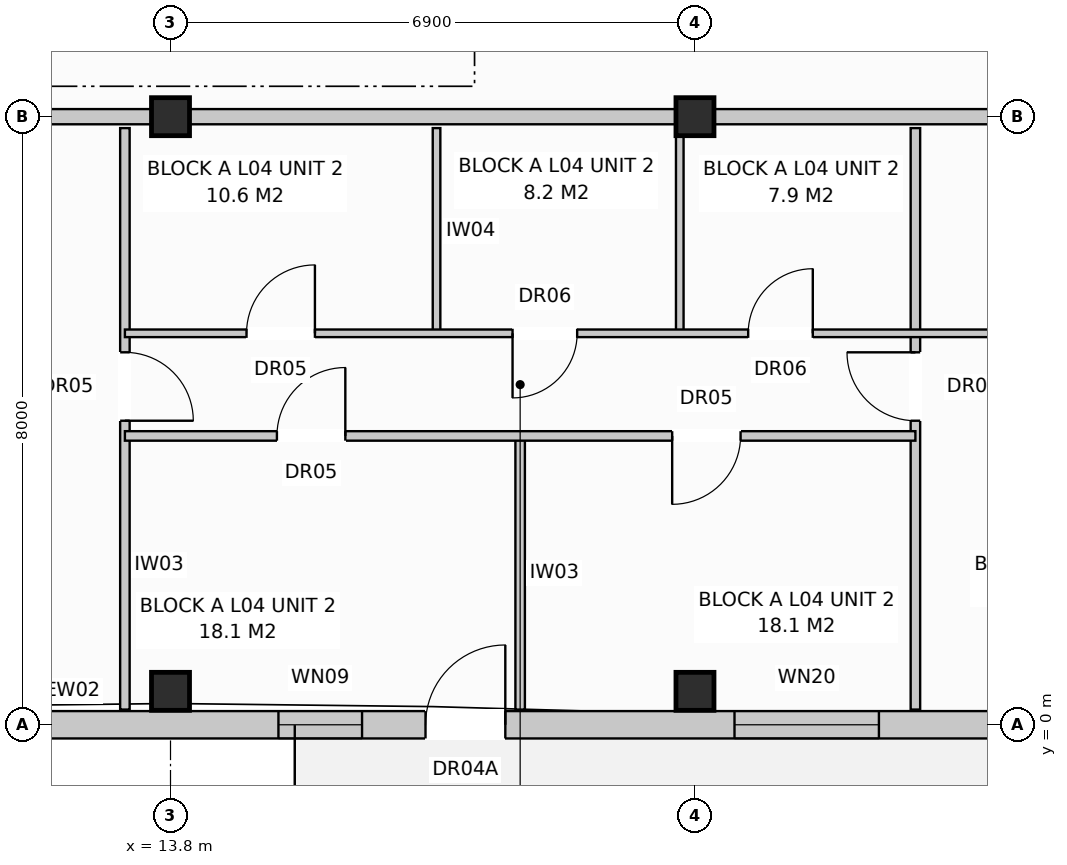
"""IFC4 building model, lengths in metres.
Left out: names, types, materials, properties, quantities, classifications, styles, units other than length and angle.
Written with IfcOpenShell. Run it as: python <this file> out.ifc"""

import sys

from ifc_helpers import new_model, si_unit, direction, frame, frame_2d, origin, origin_with_axes, origin_2d, place, context, subcontext, project, spatial, rectangle, extrude, element, fill, save


model = new_model("IFC4")
c1 = context("Model", 3, precision=1e-05, world=origin(), true_north=direction((0.0, 1.0)))
c2 = subcontext(c1, "Body", "Model", "MODEL_VIEW")
j1 = project(units=[si_unit("LENGTHUNIT", "METRE"), si_unit("PLANEANGLEUNIT", "RADIAN")], contexts=[c1])
p1 = place(None, origin())
s1 = spatial("IfcSite", under=j1, at=p1, CompositionType="ELEMENT")
p2 = place(p1, origin())
s2 = spatial("IfcBuilding", under=s1, at=p2, CompositionType="ELEMENT")
p3 = place(p2, frame((0.0, 0.0, 14.4)))
s3 = spatial("IfcBuildingStorey", under=s2, at=p3, CompositionType="ELEMENT", Elevation=14.4)
for number, where, z_axis, x_axis in (
    (1, (13.8, 0.44, 0.0), (0.0, 0.0, 1.0), (1.0, 0.0, 0.0)),
    (2, (13.8, 8.0, 0.0), (0.0, 0.0, 1.0), (1.0, 0.0, 0.0)),
    (3, (20.7, 0.44, 0.0), (0.0, 0.0, 1.0), (1.0, 0.0, 0.0)),
    (4, (20.7, 8.0, 0.0), (0.0, 0.0, 1.0), (1.0, 0.0, 0.0)),
):
    element("IfcColumn", number, at=place(p3, frame(where, z_axis=z_axis, x_axis=x_axis)), inside=s3, PredefinedType="COLUMN", context=c2, shape_type="SweptSolid", body=[
        extrude(rectangle(XDim=0.5, YDim=0.5, at=origin_2d()), origin(), (0.0, 0.0, 1.0), 3.2),
    ])
p4 = place(p3, frame((0.17, 0.0, 0.0), z_axis=(0.0, 0.0, 1.0), x_axis=(1.0, 0.0, 0.0)))
e5 = element("IfcWall", 5, at=p4, inside=s3, PredefinedType="STANDARD", context=c2, shape_type="SweptSolid", body=[
    extrude(rectangle(XDim=54.86, YDim=0.36, at=frame_2d((27.43, 0.0))), origin(), (0.0, 0.0, 1.0), 2.94),
])
p5 = place(p4, frame((2.485, 0.0, 0.0)))
e6 = element("IfcOpeningElement", 6, at=p5, cuts=e5, PredefinedType="OPENING", context=c2, shape_type="SweptSolid", body=[
    extrude(rectangle(XDim=1.05, YDim=2.12, at=frame_2d((0.525, 1.06))), frame((0.0, 0.192, 0.0), z_axis=(0.0, -1.0, 0.0), x_axis=(1.0, 0.0, 0.0)), (0.0, 0.0, 1.0), 0.384),
])
p6 = place(p4, frame((16.985, 0.0, 0.0)))
e7 = element("IfcOpeningElement", 7, at=p6, cuts=e5, PredefinedType="OPENING", context=c2, shape_type="SweptSolid", body=[
    extrude(rectangle(XDim=1.05, YDim=2.12, at=frame_2d((0.525, 1.06))), frame((0.0, 0.192, 0.0), z_axis=(0.0, -1.0, 0.0), x_axis=(1.0, 0.0, 0.0)), (0.0, 0.0, 1.0), 0.384),
])
p7 = place(p4, frame((30.085, 0.0, 0.0)))
e8 = element("IfcOpeningElement", 8, at=p7, cuts=e5, PredefinedType="OPENING", context=c2, shape_type="SweptSolid", body=[
    extrude(rectangle(XDim=1.05, YDim=2.12, at=frame_2d((0.525, 1.06))), frame((0.0, 0.192, 0.0), z_axis=(0.0, -1.0, 0.0), x_axis=(1.0, 0.0, 0.0)), (0.0, 0.0, 1.0), 0.384),
])
p8 = place(p4, frame((44.141, 0.0, 0.0)))
e9 = element("IfcOpeningElement", 9, at=p8, cuts=e5, PredefinedType="OPENING", context=c2, shape_type="SweptSolid", body=[
    extrude(rectangle(XDim=1.05, YDim=2.12, at=frame_2d((0.525, 1.06))), frame((0.0, 0.192, 0.0), z_axis=(0.0, -1.0, 0.0), x_axis=(1.0, 0.0, 0.0)), (0.0, 0.0, 1.0), 0.384),
])
p9 = place(p4, frame((0.75, 0.0, 0.72)))
e10 = element("IfcOpeningElement", 10, at=p9, cuts=e5, PredefinedType="OPENING", context=c2, shape_type="SweptSolid", body=[
    extrude(rectangle(XDim=1.1, YDim=1.5, at=frame_2d((0.55, 0.75))), frame((0.0, 0.192, 0.0), z_axis=(0.0, -1.0, 0.0), x_axis=(1.0, 0.0, 0.0)), (0.0, 0.0, 1.0), 0.384),
])
p10 = place(p4, frame((4.25, 0.0, 0.72)))
e11 = element("IfcOpeningElement", 11, at=p10, cuts=e5, PredefinedType="OPENING", context=c2, shape_type="SweptSolid", body=[
    extrude(rectangle(XDim=1.9, YDim=1.85, at=frame_2d((0.95, 0.925))), frame((0.0, 0.192, 0.0), z_axis=(0.0, -1.0, 0.0), x_axis=(1.0, 0.0, 0.0)), (0.0, 0.0, 1.0), 0.384),
])
p11 = place(p4, frame((8.925, 0.0, 0.8)))
e12 = element("IfcOpeningElement", 12, at=p11, cuts=e5, PredefinedType="OPENING", context=c2, shape_type="SweptSolid", body=[
    extrude(rectangle(XDim=1.95, YDim=1.65, at=frame_2d((0.975, 0.825))), frame((0.0, 0.192, 0.0), z_axis=(0.0, -1.0, 0.0), x_axis=(1.0, 0.0, 0.0)), (0.0, 0.0, 1.0), 0.384),
])
p12 = place(p4, frame((15.05, 0.0, 0.72)))
e13 = element("IfcOpeningElement", 13, at=p12, cuts=e5, PredefinedType="OPENING", context=c2, shape_type="SweptSolid", body=[
    extrude(rectangle(XDim=1.1, YDim=1.5, at=frame_2d((0.55, 0.75))), frame((0.0, 0.192, 0.0), z_axis=(0.0, -1.0, 0.0), x_axis=(1.0, 0.0, 0.0)), (0.0, 0.0, 1.0), 0.384),
])
p13 = place(p4, frame((21.05, 0.0, 0.72)))
e14 = element("IfcOpeningElement", 14, at=p13, cuts=e5, PredefinedType="OPENING", context=c2, shape_type="SweptSolid", body=[
    extrude(rectangle(XDim=1.9, YDim=1.85, at=frame_2d((0.95, 0.925))), frame((0.0, 0.192, 0.0), z_axis=(0.0, -1.0, 0.0), x_axis=(1.0, 0.0, 0.0)), (0.0, 0.0, 1.0), 0.384),
])
p14 = place(p4, frame((24.85, 0.0, 0.72)))
e15 = element("IfcOpeningElement", 15, at=p14, cuts=e5, PredefinedType="OPENING", context=c2, shape_type="SweptSolid", body=[
    extrude(rectangle(XDim=1.1, YDim=1.5, at=frame_2d((0.55, 0.75))), frame((0.0, 0.192, 0.0), z_axis=(0.0, -1.0, 0.0), x_axis=(1.0, 0.0, 0.0)), (0.0, 0.0, 1.0), 0.384),
])
p15 = place(p4, frame((28.35, 0.0, 0.72)))
e16 = element("IfcOpeningElement", 16, at=p15, cuts=e5, PredefinedType="OPENING", context=c2, shape_type="SweptSolid", body=[
    extrude(rectangle(XDim=1.1, YDim=1.5, at=frame_2d((0.55, 0.75))), frame((0.0, 0.192, 0.0), z_axis=(0.0, -1.0, 0.0), x_axis=(1.0, 0.0, 0.0)), (0.0, 0.0, 1.0), 0.384),
])
p16 = place(p4, frame((31.85, 0.0, 0.72)))
e17 = element("IfcOpeningElement", 17, at=p16, cuts=e5, PredefinedType="OPENING", context=c2, shape_type="SweptSolid", body=[
    extrude(rectangle(XDim=1.9, YDim=1.85, at=frame_2d((0.95, 0.925))), frame((0.0, 0.192, 0.0), z_axis=(0.0, -1.0, 0.0), x_axis=(1.0, 0.0, 0.0)), (0.0, 0.0, 1.0), 0.384),
])
p17 = place(p4, frame((35.525, 0.0, 0.8)))
e18 = element("IfcOpeningElement", 18, at=p17, cuts=e5, PredefinedType="OPENING", context=c2, shape_type="SweptSolid", body=[
    extrude(rectangle(XDim=1.95, YDim=1.65, at=frame_2d((0.975, 0.825))), frame((0.0, 0.192, 0.0), z_axis=(0.0, -1.0, 0.0), x_axis=(1.0, 0.0, 0.0)), (0.0, 0.0, 1.0), 0.384),
])
p18 = place(p4, frame((39.25, 0.0, 0.72)))
e19 = element("IfcOpeningElement", 19, at=p18, cuts=e5, PredefinedType="OPENING", context=c2, shape_type="SweptSolid", body=[
    extrude(rectangle(XDim=1.1, YDim=1.5, at=frame_2d((0.55, 0.75))), frame((0.0, 0.192, 0.0), z_axis=(0.0, -1.0, 0.0), x_axis=(1.0, 0.0, 0.0)), (0.0, 0.0, 1.0), 0.384),
])
p19 = place(p4, frame((42.35, 0.0, 0.72)))
e20 = element("IfcOpeningElement", 20, at=p19, cuts=e5, PredefinedType="OPENING", context=c2, shape_type="SweptSolid", body=[
    extrude(rectangle(XDim=1.1, YDim=1.5, at=frame_2d((0.55, 0.75))), frame((0.0, 0.192, 0.0), z_axis=(0.0, -1.0, 0.0), x_axis=(1.0, 0.0, 0.0)), (0.0, 0.0, 1.0), 0.384),
])
p20 = place(p4, frame((45.725, 0.0, 0.8)))
e21 = element("IfcOpeningElement", 21, at=p20, cuts=e5, PredefinedType="OPENING", context=c2, shape_type="SweptSolid", body=[
    extrude(rectangle(XDim=1.95, YDim=1.65, at=frame_2d((0.975, 0.825))), frame((0.0, 0.192, 0.0), z_axis=(0.0, -1.0, 0.0), x_axis=(1.0, 0.0, 0.0)), (0.0, 0.0, 1.0), 0.384),
])
p21 = place(p4, frame((51.85, 0.0, 0.72)))
e22 = element("IfcOpeningElement", 22, at=p21, cuts=e5, PredefinedType="OPENING", context=c2, shape_type="SweptSolid", body=[
    extrude(rectangle(XDim=1.1, YDim=1.5, at=frame_2d((0.55, 0.75))), frame((0.0, 0.192, 0.0), z_axis=(0.0, -1.0, 0.0), x_axis=(1.0, 0.0, 0.0)), (0.0, 0.0, 1.0), 0.384),
])
p22 = place(p3, frame((6.9, 8.0, 0.0), z_axis=(0.0, 0.0, 1.0), x_axis=(1.0, 0.0, 0.0)))
e23 = element("IfcWall", 23, at=p22, inside=s3, PredefinedType="PARTITIONING", context=c2, shape_type="SweptSolid", body=[
    extrude(rectangle(XDim=20.7, YDim=0.2, at=frame_2d((10.35, 0.0))), origin(), (0.0, 0.0, 1.0), 2.38),
])
p23 = place(p22, frame((2.4, 0.0, 0.0)))
e24 = element("IfcOpeningElement", 24, at=p23, cuts=e23, PredefinedType="OPENING", context=c2, shape_type="SweptSolid", body=[
    extrude(rectangle(XDim=0.95, YDim=2.15, at=frame_2d((0.475, 1.075))), frame((0.0, 0.112, 0.0), z_axis=(0.0, -1.0, 0.0), x_axis=(1.0, 0.0, 0.0)), (0.0, 0.0, 1.0), 0.224),
])
p24 = place(p3, frame((13.2, 7.85, 0.0), z_axis=(0.0, 0.0, 1.0), x_axis=(0.0, -1.0, 0.0)))
e25 = element("IfcWall", 25, at=p24, inside=s3, PredefinedType="PARTITIONING", context=c2, shape_type="SweptSolid", body=[
    extrude(rectangle(XDim=7.65, YDim=0.125, at=frame_2d((3.825, 0.0))), origin(), (0.0, 0.0, 1.0), 2.94),
])
p25 = place(p24, frame((2.95, 0.0, 0.0)))
e26 = element("IfcOpeningElement", 26, at=p25, cuts=e25, PredefinedType="OPENING", context=c2, shape_type="SweptSolid", body=[
    extrude(rectangle(XDim=0.9, YDim=2.1, at=frame_2d((0.45, 1.05))), frame((0.0, 0.074, 0.0), z_axis=(0.0, -1.0, 0.0), x_axis=(1.0, 0.0, 0.0)), (0.0, 0.0, 1.0), 0.149),
])
for number, where, z_axis, x_axis in (
    (27, (17.3, 7.85, 0.0), (0.0, 0.0, 1.0), (0.0, -1.0, 0.0)),
    (28, (20.5, 7.85, 0.0), (0.0, 0.0, 1.0), (0.0, -1.0, 0.0)),
):
    element("IfcWall", number, at=place(p3, frame(where, z_axis=z_axis, x_axis=x_axis)), inside=s3, PredefinedType="PARTITIONING", context=c2, shape_type="SweptSolid", body=[
        extrude(rectangle(XDim=2.7, YDim=0.1, at=frame_2d((1.35, 0.0))), origin(), (0.0, 0.0, 1.0), 2.94),
    ])
p26 = place(p3, frame((18.4, 3.8, 0.0), z_axis=(0.0, 0.0, 1.0), x_axis=(0.0, -1.0, 0.0)))
e29 = element("IfcWall", 29, at=p26, inside=s3, PredefinedType="PARTITIONING", context=c2, shape_type="SweptSolid", body=[
    extrude(rectangle(XDim=3.6, YDim=0.125, at=frame_2d((1.8, 0.0))), origin(), (0.0, 0.0, 1.0), 2.94),
])
p27 = place(p3, frame((23.6, 7.85, 0.0), z_axis=(0.0, 0.0, 1.0), x_axis=(0.0, -1.0, 0.0)))
e30 = element("IfcWall", 30, at=p27, inside=s3, PredefinedType="PARTITIONING", context=c2, shape_type="SweptSolid", body=[
    extrude(rectangle(XDim=7.65, YDim=0.125, at=frame_2d((3.825, 0.0))), origin(), (0.0, 0.0, 1.0), 2.94),
])
p28 = place(p27, frame((2.95, 0.0, 0.0)))
e31 = element("IfcOpeningElement", 31, at=p28, cuts=e30, PredefinedType="OPENING", context=c2, shape_type="SweptSolid", body=[
    extrude(rectangle(XDim=0.9, YDim=2.1, at=frame_2d((0.45, 1.05))), frame((0.0, 0.074, 0.0), z_axis=(0.0, -1.0, 0.0), x_axis=(1.0, 0.0, 0.0)), (0.0, 0.0, 1.0), 0.149),
])
p29 = place(p3, frame((13.2, 5.15, 0.0), z_axis=(0.0, 0.0, 1.0), x_axis=(1.0, 0.0, 0.0)))
e32 = element("IfcWall", 32, at=p29, inside=s3, PredefinedType="PARTITIONING", context=c2, shape_type="SweptSolid", body=[
    extrude(rectangle(XDim=14.3, YDim=0.1, at=frame_2d((7.15, 0.0))), origin(), (0.0, 0.0, 1.0), 2.94),
])
p30 = place(p29, frame((1.6, 0.0, 0.0)))
e33 = element("IfcOpeningElement", 33, at=p30, cuts=e32, PredefinedType="OPENING", context=c2, shape_type="SweptSolid", body=[
    extrude(rectangle(XDim=0.9, YDim=2.1, at=frame_2d((0.45, 1.05))), frame((0.0, 0.062, 0.0), z_axis=(0.0, -1.0, 0.0), x_axis=(1.0, 0.0, 0.0)), (0.0, 0.0, 1.0), 0.124),
])
p31 = place(p29, frame((5.1, 0.0, 0.0)))
e34 = element("IfcOpeningElement", 34, at=p31, cuts=e32, PredefinedType="OPENING", context=c2, shape_type="SweptSolid", body=[
    extrude(rectangle(XDim=0.85, YDim=2.05, at=frame_2d((0.425, 1.025))), frame((0.0, 0.062, 0.0), z_axis=(0.0, -1.0, 0.0), x_axis=(1.0, 0.0, 0.0)), (0.0, 0.0, 1.0), 0.124),
])
p32 = place(p29, frame((8.2, 0.0, 0.0)))
e35 = element("IfcOpeningElement", 35, at=p32, cuts=e32, PredefinedType="OPENING", context=c2, shape_type="SweptSolid", body=[
    extrude(rectangle(XDim=0.85, YDim=2.05, at=frame_2d((0.425, 1.025))), frame((0.0, 0.062, 0.0), z_axis=(0.0, -1.0, 0.0), x_axis=(1.0, 0.0, 0.0)), (0.0, 0.0, 1.0), 0.124),
])
p33 = place(p29, frame((11.6, 0.0, 0.0)))
e36 = element("IfcOpeningElement", 36, at=p33, cuts=e32, PredefinedType="OPENING", context=c2, shape_type="SweptSolid", body=[
    extrude(rectangle(XDim=0.85, YDim=2.05, at=frame_2d((0.425, 1.025))), frame((0.0, 0.062, 0.0), z_axis=(0.0, -1.0, 0.0), x_axis=(1.0, 0.0, 0.0)), (0.0, 0.0, 1.0), 0.124),
])
p34 = place(p3, frame((13.2, 3.8, 0.0), z_axis=(0.0, 0.0, 1.0), x_axis=(1.0, 0.0, 0.0)))
e37 = element("IfcWall", 37, at=p34, inside=s3, PredefinedType="PARTITIONING", context=c2, shape_type="SweptSolid", body=[
    extrude(rectangle(XDim=10.4, YDim=0.125, at=frame_2d((5.2, 0.0))), origin(), (0.0, 0.0, 1.0), 2.94),
])
p35 = place(p34, frame((2.0, 0.0, 0.0)))
e38 = element("IfcOpeningElement", 38, at=p35, cuts=e37, PredefinedType="OPENING", context=c2, shape_type="SweptSolid", body=[
    extrude(rectangle(XDim=0.9, YDim=2.1, at=frame_2d((0.45, 1.05))), frame((0.0, 0.074, 0.0), z_axis=(0.0, -1.0, 0.0), x_axis=(1.0, 0.0, 0.0)), (0.0, 0.0, 1.0), 0.149),
])
p36 = place(p34, frame((7.2, 0.0, 0.0)))
e39 = element("IfcOpeningElement", 39, at=p36, cuts=e37, PredefinedType="OPENING", context=c2, shape_type="SweptSolid", body=[
    extrude(rectangle(XDim=0.9, YDim=2.1, at=frame_2d((0.45, 1.05))), frame((0.0, 0.074, 0.0), z_axis=(0.0, -1.0, 0.0), x_axis=(1.0, 0.0, 0.0)), (0.0, 0.0, 1.0), 0.149),
])
p37 = place(p6, origin_with_axes())
e40 = element("IfcDoor", 40, at=p37, inside=s3, OperationType="SINGLE_SWING_RIGHT", PredefinedType="DOOR", context=c2, shape_type="SweptSolid", body=[
    extrude(rectangle(XDim=1.05, YDim=2.12, at=frame_2d((0.525, 1.06))), frame((0.0, 0.025, 0.0), z_axis=(0.0, -1.0, 0.0), x_axis=(1.0, 0.0, 0.0)), (0.0, 0.0, 1.0), 0.05),
])
fill(e7, e40)
p38 = place(p12, origin_with_axes())
e41 = element("IfcWindow", 41, at=p38, inside=s3, PartitioningType="SINGLE_PANEL", PredefinedType="WINDOW", context=c2, shape_type="SweptSolid", body=[
    extrude(rectangle(XDim=1.1, YDim=1.5, at=frame_2d((0.55, 0.75))), frame((0.0, 0.03, 0.0), z_axis=(0.0, -1.0, 0.0), x_axis=(1.0, 0.0, 0.0)), (0.0, 0.0, 1.0), 0.06),
])
fill(e13, e41)
p39 = place(p13, origin_with_axes())
e42 = element("IfcWindow", 42, at=p39, inside=s3, PartitioningType="SINGLE_PANEL", PredefinedType="WINDOW", context=c2, shape_type="SweptSolid", body=[
    extrude(rectangle(XDim=1.9, YDim=1.85, at=frame_2d((0.95, 0.925))), frame((0.0, 0.03, 0.0), z_axis=(0.0, -1.0, 0.0), x_axis=(1.0, 0.0, 0.0)), (0.0, 0.0, 1.0), 0.06),
])
fill(e14, e42)
p40 = place(p25, origin_with_axes())
e43 = element("IfcDoor", 43, at=p40, inside=s3, OperationType="SINGLE_SWING_RIGHT", PredefinedType="DOOR", context=c2, shape_type="SweptSolid", body=[
    extrude(rectangle(XDim=0.9, YDim=2.1, at=frame_2d((0.45, 1.05))), frame((0.0, 0.025, 0.0), z_axis=(0.0, -1.0, 0.0), x_axis=(1.0, 0.0, 0.0)), (0.0, 0.0, 1.0), 0.05),
])
fill(e26, e43)
p41 = place(p28, frame((0.9, 0.0, 0.0), z_axis=(0.0, 0.0, 1.0), x_axis=(-1.0, 0.0, 0.0)))
e44 = element("IfcDoor", 44, at=p41, inside=s3, OperationType="SINGLE_SWING_LEFT", PredefinedType="DOOR", context=c2, shape_type="SweptSolid", body=[
    extrude(rectangle(XDim=0.9, YDim=2.1, at=frame_2d((0.45, 1.05))), frame((0.0, 0.025, 0.0), z_axis=(0.0, -1.0, 0.0), x_axis=(1.0, 0.0, 0.0)), (0.0, 0.0, 1.0), 0.05),
])
fill(e31, e44)
p42 = place(p30, origin_with_axes())
e45 = element("IfcDoor", 45, at=p42, inside=s3, OperationType="SINGLE_SWING_RIGHT", PredefinedType="DOOR", context=c2, shape_type="SweptSolid", body=[
    extrude(rectangle(XDim=0.9, YDim=2.1, at=frame_2d((0.45, 1.05))), frame((0.0, 0.025, 0.0), z_axis=(0.0, -1.0, 0.0), x_axis=(1.0, 0.0, 0.0)), (0.0, 0.0, 1.0), 0.05),
])
fill(e33, e45)
p43 = place(p31, frame((0.85, 0.0, 0.0), z_axis=(0.0, 0.0, 1.0), x_axis=(-1.0, 0.0, 0.0)))
e46 = element("IfcDoor", 46, at=p43, inside=s3, OperationType="SINGLE_SWING_LEFT", PredefinedType="DOOR", context=c2, shape_type="SweptSolid", body=[
    extrude(rectangle(XDim=0.85, YDim=2.05, at=frame_2d((0.425, 1.025))), frame((0.0, 0.025, 0.0), z_axis=(0.0, -1.0, 0.0), x_axis=(1.0, 0.0, 0.0)), (0.0, 0.0, 1.0), 0.05),
])
fill(e34, e46)
p44 = place(p32, origin_with_axes())
e47 = element("IfcDoor", 47, at=p44, inside=s3, OperationType="SINGLE_SWING_RIGHT", PredefinedType="DOOR", context=c2, shape_type="SweptSolid", body=[
    extrude(rectangle(XDim=0.85, YDim=2.05, at=frame_2d((0.425, 1.025))), frame((0.0, 0.025, 0.0), z_axis=(0.0, -1.0, 0.0), x_axis=(1.0, 0.0, 0.0)), (0.0, 0.0, 1.0), 0.05),
])
fill(e35, e47)
p45 = place(p35, origin_with_axes())
e48 = element("IfcDoor", 48, at=p45, inside=s3, OperationType="SINGLE_SWING_RIGHT", PredefinedType="DOOR", context=c2, shape_type="SweptSolid", body=[
    extrude(rectangle(XDim=0.9, YDim=2.1, at=frame_2d((0.45, 1.05))), frame((0.0, 0.025, 0.0), z_axis=(0.0, -1.0, 0.0), x_axis=(1.0, 0.0, 0.0)), (0.0, 0.0, 1.0), 0.05),
])
fill(e38, e48)
p46 = place(p36, frame((0.9, 0.0, 0.0), z_axis=(0.0, 0.0, 1.0), x_axis=(-1.0, 0.0, 0.0)))
e49 = element("IfcDoor", 49, at=p46, inside=s3, OperationType="SINGLE_SWING_LEFT", PredefinedType="DOOR", context=c2, shape_type="SweptSolid", body=[
    extrude(rectangle(XDim=0.9, YDim=2.1, at=frame_2d((0.45, 1.05))), frame((0.0, 0.025, 0.0), z_axis=(0.0, -1.0, 0.0), x_axis=(1.0, 0.0, 0.0)), (0.0, 0.0, 1.0), 0.05),
])
fill(e39, e49)
save(model, sys.argv[1])
